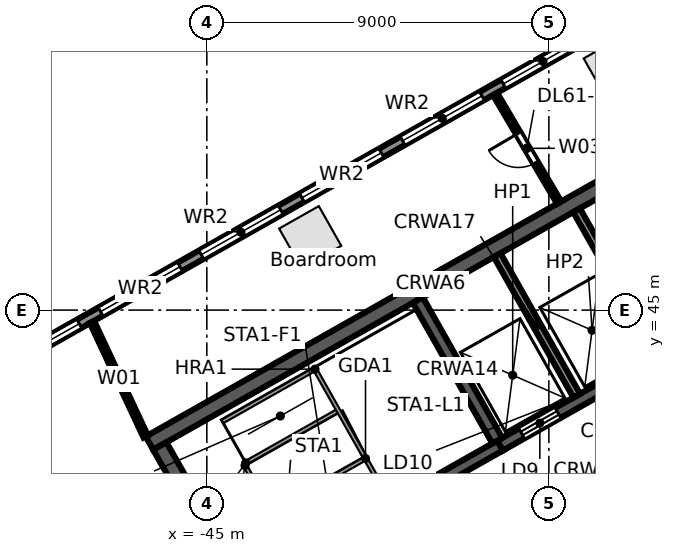
"""IFC4 building model, lengths in metres.
Left out: names, types, materials, properties, quantities, classifications, styles, units other than length and angle.
Written with IfcOpenShell. Run it as: python <this file> out.ifc"""

import sys

from ifc_helpers import new_model, si_unit, direction, frame, frame_2d, origin, origin_2d, place, context, subcontext, project, spatial, rectangle, extrude, element, fill, save


model = new_model("IFC4")
c1 = context("Model", 3, precision=1e-05, world=origin(), true_north=direction((0.0, 1.0)))
c2 = subcontext(c1, "Body", "Model", "MODEL_VIEW")
j1 = project(units=[si_unit("LENGTHUNIT", "METRE"), si_unit("PLANEANGLEUNIT", "RADIAN")], contexts=[c1])
p1 = place(None, origin())
s1 = spatial("IfcSite", under=j1, at=p1, CompositionType="ELEMENT")
p2 = place(p1, origin())
s2 = spatial("IfcBuilding", under=s1, at=p2, CompositionType="ELEMENT")
p3 = place(p2, frame((0.0, 0.0, 274.1)))
s3 = spatial("IfcBuildingStorey", under=s2, at=p3, CompositionType="ELEMENT", Elevation=274.1)
p4 = place(p3, frame((-34.334, 51.414, 0.0), z_axis=(0.0, 0.0, 1.0), x_axis=(-0.87035569594, -0.492423560103, 0.0)))
e1 = element("IfcColumn", 1, at=p4, inside=s3, PredefinedType="COLUMN", context=c2, shape_type="SweptSolid", body=[
    extrude(rectangle(XDim=1.1, YDim=1.1, at=origin_2d()), origin(), (0.0, 0.0, 1.0), 3.8),
])
p5 = place(p3, frame((-42.28, 46.919, 0.0), z_axis=(0.0, 0.0, 1.0), x_axis=(-0.87035569594, -0.492423560103, 0.0)))
e2 = element("IfcColumn", 2, at=p5, inside=s3, PredefinedType="COLUMN", context=c2, shape_type="SweptSolid", body=[
    extrude(rectangle(XDim=1.2, YDim=1.2, at=origin_2d()), origin(), (0.0, 0.0, 1.0), 3.8),
])
p6 = place(p3, frame((-58.732, 38.771, 0.0), z_axis=(0.0, 0.0, 1.0), x_axis=(0.870355615581, 0.492423702137, 0.0)))
e3 = element("IfcWall", 3, at=p6, inside=s3, PredefinedType="STANDARD", context=c2, shape_type="SweptSolid", body=[
    extrude(rectangle(XDim=64.052, YDim=0.25, at=frame_2d((32.026, 0.0))), origin(), (0.0, 0.0, 1.0), 3.52),
])
p7 = place(p6, frame((61.259, 0.0, 0.8)))
e4 = element("IfcOpeningElement", 4, at=p7, cuts=e3, PredefinedType="OPENING", context=c2, shape_type="SweptSolid", body=[
    extrude(rectangle(XDim=2.4, YDim=2.2, at=frame_2d((1.2, 1.1))), frame((0.0, 0.135, 0.0), z_axis=(0.0, -1.0, 0.0), x_axis=(1.0, 0.0, 0.0)), (0.0, 0.0, 1.0), 0.27),
])
p8 = place(p6, frame((58.216, 0.0, 0.8)))
e5 = element("IfcOpeningElement", 5, at=p8, cuts=e3, PredefinedType="OPENING", context=c2, shape_type="SweptSolid", body=[
    extrude(rectangle(XDim=2.4, YDim=2.2, at=frame_2d((1.2, 1.1))), frame((0.0, 0.135, 0.0), z_axis=(0.0, -1.0, 0.0), x_axis=(1.0, 0.0, 0.0)), (0.0, 0.0, 1.0), 0.27),
])
p9 = place(p6, frame((55.173, 0.0, 0.8)))
e6 = element("IfcOpeningElement", 6, at=p9, cuts=e3, PredefinedType="OPENING", context=c2, shape_type="SweptSolid", body=[
    extrude(rectangle(XDim=2.4, YDim=2.2, at=frame_2d((1.2, 1.1))), frame((0.0, 0.135, 0.0), z_axis=(0.0, -1.0, 0.0), x_axis=(1.0, 0.0, 0.0)), (0.0, 0.0, 1.0), 0.27),
])
p10 = place(p6, frame((52.129, 0.0, 0.8)))
e7 = element("IfcOpeningElement", 7, at=p10, cuts=e3, PredefinedType="OPENING", context=c2, shape_type="SweptSolid", body=[
    extrude(rectangle(XDim=2.4, YDim=2.2, at=frame_2d((1.2, 1.1))), frame((0.0, 0.135, 0.0), z_axis=(0.0, -1.0, 0.0), x_axis=(1.0, 0.0, 0.0)), (0.0, 0.0, 1.0), 0.27),
])
p11 = place(p6, frame((49.086, 0.0, 0.8)))
e8 = element("IfcOpeningElement", 8, at=p11, cuts=e3, PredefinedType="OPENING", context=c2, shape_type="SweptSolid", body=[
    extrude(rectangle(XDim=2.4, YDim=2.2, at=frame_2d((1.2, 1.1))), frame((0.0, 0.135, 0.0), z_axis=(0.0, -1.0, 0.0), x_axis=(1.0, 0.0, 0.0)), (0.0, 0.0, 1.0), 0.27),
])
p12 = place(p6, frame((46.043, 0.0, 0.8)))
e9 = element("IfcOpeningElement", 9, at=p12, cuts=e3, PredefinedType="OPENING", context=c2, shape_type="SweptSolid", body=[
    extrude(rectangle(XDim=2.4, YDim=2.2, at=frame_2d((1.2, 1.1))), frame((0.0, 0.135, 0.0), z_axis=(0.0, -1.0, 0.0), x_axis=(1.0, 0.0, 0.0)), (0.0, 0.0, 1.0), 0.27),
])
p13 = place(p6, frame((43.0, 0.0, 0.8)))
e10 = element("IfcOpeningElement", 10, at=p13, cuts=e3, PredefinedType="OPENING", context=c2, shape_type="SweptSolid", body=[
    extrude(rectangle(XDim=2.4, YDim=2.2, at=frame_2d((1.2, 1.1))), frame((0.0, 0.135, 0.0), z_axis=(0.0, -1.0, 0.0), x_axis=(1.0, 0.0, 0.0)), (0.0, 0.0, 1.0), 0.27),
])
p14 = place(p6, frame((39.956, 0.0, 0.8)))
e11 = element("IfcOpeningElement", 11, at=p14, cuts=e3, PredefinedType="OPENING", context=c2, shape_type="SweptSolid", body=[
    extrude(rectangle(XDim=2.4, YDim=2.2, at=frame_2d((1.2, 1.1))), frame((0.0, 0.135, 0.0), z_axis=(0.0, -1.0, 0.0), x_axis=(1.0, 0.0, 0.0)), (0.0, 0.0, 1.0), 0.27),
])
p15 = place(p6, frame((36.913, 0.0, 0.8)))
e12 = element("IfcOpeningElement", 12, at=p15, cuts=e3, PredefinedType="OPENING", context=c2, shape_type="SweptSolid", body=[
    extrude(rectangle(XDim=2.4, YDim=2.2, at=frame_2d((1.2, 1.1))), frame((0.0, 0.135, 0.0), z_axis=(0.0, -1.0, 0.0), x_axis=(1.0, 0.0, 0.0)), (0.0, 0.0, 1.0), 0.27),
])
p16 = place(p6, frame((33.87, 0.0, 0.8)))
e13 = element("IfcOpeningElement", 13, at=p16, cuts=e3, PredefinedType="OPENING", context=c2, shape_type="SweptSolid", body=[
    extrude(rectangle(XDim=2.4, YDim=2.2, at=frame_2d((1.2, 1.1))), frame((0.0, 0.135, 0.0), z_axis=(0.0, -1.0, 0.0), x_axis=(1.0, 0.0, 0.0)), (0.0, 0.0, 1.0), 0.27),
])
p17 = place(p6, frame((30.826, 0.0, 0.8)))
e14 = element("IfcOpeningElement", 14, at=p17, cuts=e3, PredefinedType="OPENING", context=c2, shape_type="SweptSolid", body=[
    extrude(rectangle(XDim=2.4, YDim=2.2, at=frame_2d((1.2, 1.1))), frame((0.0, 0.135, 0.0), z_axis=(0.0, -1.0, 0.0), x_axis=(1.0, 0.0, 0.0)), (0.0, 0.0, 1.0), 0.27),
])
p18 = place(p6, frame((27.783, 0.0, 0.8)))
e15 = element("IfcOpeningElement", 15, at=p18, cuts=e3, PredefinedType="OPENING", context=c2, shape_type="SweptSolid", body=[
    extrude(rectangle(XDim=2.4, YDim=2.2, at=frame_2d((1.2, 1.1))), frame((0.0, 0.135, 0.0), z_axis=(0.0, -1.0, 0.0), x_axis=(1.0, 0.0, 0.0)), (0.0, 0.0, 1.0), 0.27),
])
p19 = place(p6, frame((24.74, 0.0, 0.8)))
e16 = element("IfcOpeningElement", 16, at=p19, cuts=e3, PredefinedType="OPENING", context=c2, shape_type="SweptSolid", body=[
    extrude(rectangle(XDim=2.4, YDim=2.2, at=frame_2d((1.2, 1.1))), frame((0.0, 0.135, 0.0), z_axis=(0.0, -1.0, 0.0), x_axis=(1.0, 0.0, 0.0)), (0.0, 0.0, 1.0), 0.27),
])
p20 = place(p6, frame((21.696, 0.0, 0.8)))
e17 = element("IfcOpeningElement", 17, at=p20, cuts=e3, PredefinedType="OPENING", context=c2, shape_type="SweptSolid", body=[
    extrude(rectangle(XDim=2.4, YDim=2.2, at=frame_2d((1.2, 1.1))), frame((0.0, 0.135, 0.0), z_axis=(0.0, -1.0, 0.0), x_axis=(1.0, 0.0, 0.0)), (0.0, 0.0, 1.0), 0.27),
])
p21 = place(p6, frame((18.653, 0.0, 0.8)))
e18 = element("IfcOpeningElement", 18, at=p21, cuts=e3, PredefinedType="OPENING", context=c2, shape_type="SweptSolid", body=[
    extrude(rectangle(XDim=2.4, YDim=2.2, at=frame_2d((1.2, 1.1))), frame((0.0, 0.135, 0.0), z_axis=(0.0, -1.0, 0.0), x_axis=(1.0, 0.0, 0.0)), (0.0, 0.0, 1.0), 0.27),
])
p22 = place(p6, frame((15.61, 0.0, 0.8)))
e19 = element("IfcOpeningElement", 19, at=p22, cuts=e3, PredefinedType="OPENING", context=c2, shape_type="SweptSolid", body=[
    extrude(rectangle(XDim=2.4, YDim=2.2, at=frame_2d((1.2, 1.1))), frame((0.0, 0.135, 0.0), z_axis=(0.0, -1.0, 0.0), x_axis=(1.0, 0.0, 0.0)), (0.0, 0.0, 1.0), 0.27),
])
p23 = place(p6, frame((12.567, 0.0, 0.8)))
e20 = element("IfcOpeningElement", 20, at=p23, cuts=e3, PredefinedType="OPENING", context=c2, shape_type="SweptSolid", body=[
    extrude(rectangle(XDim=2.4, YDim=2.2, at=frame_2d((1.2, 1.1))), frame((0.0, 0.135, 0.0), z_axis=(0.0, -1.0, 0.0), x_axis=(1.0, 0.0, 0.0)), (0.0, 0.0, 1.0), 0.27),
])
p24 = place(p6, frame((9.523, 0.0, 0.8)))
e21 = element("IfcOpeningElement", 21, at=p24, cuts=e3, PredefinedType="OPENING", context=c2, shape_type="SweptSolid", body=[
    extrude(rectangle(XDim=2.4, YDim=2.2, at=frame_2d((1.2, 1.1))), frame((0.0, 0.135, 0.0), z_axis=(0.0, -1.0, 0.0), x_axis=(1.0, 0.0, 0.0)), (0.0, 0.0, 1.0), 0.27),
])
p25 = place(p6, frame((6.48, 0.0, 0.8)))
e22 = element("IfcOpeningElement", 22, at=p25, cuts=e3, PredefinedType="OPENING", context=c2, shape_type="SweptSolid", body=[
    extrude(rectangle(XDim=2.4, YDim=2.2, at=frame_2d((1.2, 1.1))), frame((0.0, 0.135, 0.0), z_axis=(0.0, -1.0, 0.0), x_axis=(1.0, 0.0, 0.0)), (0.0, 0.0, 1.0), 0.27),
])
p26 = place(p6, frame((3.437, 0.0, 0.8)))
e23 = element("IfcOpeningElement", 23, at=p26, cuts=e3, PredefinedType="OPENING", context=c2, shape_type="SweptSolid", body=[
    extrude(rectangle(XDim=2.4, YDim=2.2, at=frame_2d((1.2, 1.1))), frame((0.0, 0.135, 0.0), z_axis=(0.0, -1.0, 0.0), x_axis=(1.0, 0.0, 0.0)), (0.0, 0.0, 1.0), 0.27),
])
p27 = place(p6, frame((0.393, 0.0, 0.8)))
e24 = element("IfcOpeningElement", 24, at=p27, cuts=e3, PredefinedType="OPENING", context=c2, shape_type="SweptSolid", body=[
    extrude(rectangle(XDim=2.4, YDim=2.2, at=frame_2d((1.2, 1.1))), frame((0.0, 0.135, 0.0), z_axis=(0.0, -1.0, 0.0), x_axis=(1.0, 0.0, 0.0)), (0.0, 0.0, 1.0), 0.27),
])
p28 = place(p3, frame((-3.017, 46.293, 0.0), z_axis=(0.0, 0.0, 1.0), x_axis=(-0.870355474887, -0.492423950812, 0.0)))
e25 = element("IfcWall", 25, at=p28, inside=s3, PredefinedType="STANDARD", context=c2, shape_type="SweptSolid", body=[
    extrude(rectangle(XDim=40.34, YDim=0.25, at=frame_2d((20.17, 0.0))), origin(), (0.0, 0.0, 1.0), 3.52),
])
p29 = place(p28, frame((37.428, 0.0, 0.8)))
e26 = element("IfcOpeningElement", 26, at=p29, cuts=e25, PredefinedType="OPENING", context=c2, shape_type="SweptSolid", body=[
    extrude(rectangle(XDim=2.4, YDim=2.2, at=frame_2d((1.2, 1.1))), frame((0.0, 0.135, 0.0), z_axis=(0.0, -1.0, 0.0), x_axis=(1.0, 0.0, 0.0)), (0.0, 0.0, 1.0), 0.27),
])
p30 = place(p28, frame((34.372, 0.0, 0.0)))
e27 = element("IfcOpeningElement", 27, at=p30, cuts=e25, PredefinedType="OPENING", context=c2, shape_type="SweptSolid", body=[
    extrude(rectangle(XDim=1.8, YDim=2.4, at=frame_2d((0.9, 1.2))), frame((0.0, 0.135, 0.0), z_axis=(0.0, -1.0, 0.0), x_axis=(1.0, 0.0, 0.0)), (0.0, 0.0, 1.0), 0.27),
])
p31 = place(p28, frame((30.716, 0.0, 0.8)))
e28 = element("IfcOpeningElement", 28, at=p31, cuts=e25, PredefinedType="OPENING", context=c2, shape_type="SweptSolid", body=[
    extrude(rectangle(XDim=2.4, YDim=2.2, at=frame_2d((1.2, 1.1))), frame((0.0, 0.135, 0.0), z_axis=(0.0, -1.0, 0.0), x_axis=(1.0, 0.0, 0.0)), (0.0, 0.0, 1.0), 0.27),
])
p32 = place(p28, frame((27.36, 0.0, 0.8)))
e29 = element("IfcOpeningElement", 29, at=p32, cuts=e25, PredefinedType="OPENING", context=c2, shape_type="SweptSolid", body=[
    extrude(rectangle(XDim=2.4, YDim=2.2, at=frame_2d((1.2, 1.1))), frame((0.0, 0.135, 0.0), z_axis=(0.0, -1.0, 0.0), x_axis=(1.0, 0.0, 0.0)), (0.0, 0.0, 1.0), 0.27),
])
p33 = place(p28, frame((24.304, 0.0, 0.0)))
e30 = element("IfcOpeningElement", 30, at=p33, cuts=e25, PredefinedType="OPENING", context=c2, shape_type="SweptSolid", body=[
    extrude(rectangle(XDim=1.8, YDim=2.4, at=frame_2d((0.9, 1.2))), frame((0.0, 0.135, 0.0), z_axis=(0.0, -1.0, 0.0), x_axis=(1.0, 0.0, 0.0)), (0.0, 0.0, 1.0), 0.27),
])
p34 = place(p28, frame((20.648, 0.0, 0.8)))
e31 = element("IfcOpeningElement", 31, at=p34, cuts=e25, PredefinedType="OPENING", context=c2, shape_type="SweptSolid", body=[
    extrude(rectangle(XDim=2.4, YDim=2.2, at=frame_2d((1.2, 1.1))), frame((0.0, 0.135, 0.0), z_axis=(0.0, -1.0, 0.0), x_axis=(1.0, 0.0, 0.0)), (0.0, 0.0, 1.0), 0.27),
])
p35 = place(p28, frame((17.292, 0.0, 0.8)))
e32 = element("IfcOpeningElement", 32, at=p35, cuts=e25, PredefinedType="OPENING", context=c2, shape_type="SweptSolid", body=[
    extrude(rectangle(XDim=2.4, YDim=2.2, at=frame_2d((1.2, 1.1))), frame((0.0, 0.135, 0.0), z_axis=(0.0, -1.0, 0.0), x_axis=(1.0, 0.0, 0.0)), (0.0, 0.0, 1.0), 0.27),
])
p36 = place(p28, frame((14.236, 0.0, 0.0)))
e33 = element("IfcOpeningElement", 33, at=p36, cuts=e25, PredefinedType="OPENING", context=c2, shape_type="SweptSolid", body=[
    extrude(rectangle(XDim=1.8, YDim=2.4, at=frame_2d((0.9, 1.2))), frame((0.0, 0.135, 0.0), z_axis=(0.0, -1.0, 0.0), x_axis=(1.0, 0.0, 0.0)), (0.0, 0.0, 1.0), 0.27),
])
p37 = place(p28, frame((10.58, 0.0, 0.8)))
e34 = element("IfcOpeningElement", 34, at=p37, cuts=e25, PredefinedType="OPENING", context=c2, shape_type="SweptSolid", body=[
    extrude(rectangle(XDim=2.4, YDim=2.2, at=frame_2d((1.2, 1.1))), frame((0.0, 0.135, 0.0), z_axis=(0.0, -1.0, 0.0), x_axis=(1.0, 0.0, 0.0)), (0.0, 0.0, 1.0), 0.27),
])
p38 = place(p28, frame((7.224, 0.0, 0.8)))
e35 = element("IfcOpeningElement", 35, at=p38, cuts=e25, PredefinedType="OPENING", context=c2, shape_type="SweptSolid", body=[
    extrude(rectangle(XDim=2.4, YDim=2.2, at=frame_2d((1.2, 1.1))), frame((0.0, 0.135, 0.0), z_axis=(0.0, -1.0, 0.0), x_axis=(1.0, 0.0, 0.0)), (0.0, 0.0, 1.0), 0.27),
])
p39 = place(p28, frame((4.168, 0.0, 0.0)))
e36 = element("IfcOpeningElement", 36, at=p39, cuts=e25, PredefinedType="OPENING", context=c2, shape_type="SweptSolid", body=[
    extrude(rectangle(XDim=1.8, YDim=2.4, at=frame_2d((0.9, 1.2))), frame((0.0, 0.135, 0.0), z_axis=(0.0, -1.0, 0.0), x_axis=(1.0, 0.0, 0.0)), (0.0, 0.0, 1.0), 0.27),
])
p40 = place(p28, frame((0.512, 0.0, 0.8)))
e37 = element("IfcOpeningElement", 37, at=p40, cuts=e25, PredefinedType="OPENING", context=c2, shape_type="SweptSolid", body=[
    extrude(rectangle(XDim=2.4, YDim=2.2, at=frame_2d((1.2, 1.1))), frame((0.0, 0.135, 0.0), z_axis=(0.0, -1.0, 0.0), x_axis=(1.0, 0.0, 0.0)), (0.0, 0.0, 1.0), 0.27),
])
p41 = place(p3, frame((-43.897, 37.692, 0.0), z_axis=(0.0, 0.0, 1.0), x_axis=(0.870356351998, 0.492422400523, 0.0)))
e38 = element("IfcWall", 38, at=p41, inside=s3, PredefinedType="SOLIDWALL", context=c2, shape_type="SweptSolid", body=[
    extrude(rectangle(XDim=7.6, YDim=0.3, at=frame_2d((3.8, 0.0))), origin(), (0.0, 0.0, 1.0), 3.52),
])
p42 = place(p41, frame((0.4, 0.0, 0.0)))
e39 = element("IfcOpeningElement", 39, at=p42, cuts=e38, PredefinedType="OPENING", context=c2, shape_type="SweptSolid", body=[
    extrude(rectangle(XDim=1.0, YDim=2.1, at=frame_2d((0.5, 1.05))), frame((0.0, 0.16, 0.0), z_axis=(0.0, -1.0, 0.0), x_axis=(1.0, 0.0, 0.0)), (0.0, 0.0, 1.0), 0.32),
])
p43 = place(p3, frame((-37.282, 41.435, 0.0), z_axis=(0.0, 0.0, 1.0), x_axis=(0.870361315115, 0.492413628113, 0.0)))
e40 = element("IfcWall", 40, at=p43, inside=s3, PredefinedType="SOLIDWALL", context=c2, shape_type="SweptSolid", body=[
    extrude(rectangle(XDim=8.6, YDim=0.3, at=frame_2d((4.3, 0.0))), origin(), (0.0, 0.0, 1.0), 3.52),
])
p44 = place(p43, frame((0.65, 0.0, 0.0)))
e41 = element("IfcOpeningElement", 41, at=p44, cuts=e40, PredefinedType="OPENING", context=c2, shape_type="SweptSolid", body=[
    extrude(rectangle(XDim=1.1, YDim=2.1, at=frame_2d((0.55, 1.05))), frame((0.0, 0.16, 0.0), z_axis=(0.0, -1.0, 0.0), x_axis=(1.0, 0.0, 0.0)), (0.0, 0.0, 1.0), 0.32),
])
p45 = place(p43, frame((3.05, 0.0, 0.0)))
e42 = element("IfcOpeningElement", 42, at=p45, cuts=e40, PredefinedType="OPENING", context=c2, shape_type="SweptSolid", body=[
    extrude(rectangle(XDim=1.1, YDim=2.1, at=frame_2d((0.55, 1.05))), frame((0.0, 0.16, 0.0), z_axis=(0.0, -1.0, 0.0), x_axis=(1.0, 0.0, 0.0)), (0.0, 0.0, 1.0), 0.32),
])
p46 = place(p43, frame((6.2, 0.0, 0.0)))
e43 = element("IfcOpeningElement", 43, at=p46, cuts=e40, PredefinedType="OPENING", context=c2, shape_type="SweptSolid", body=[
    extrude(rectangle(XDim=1.1, YDim=2.1, at=frame_2d((0.55, 1.05))), frame((0.0, 0.16, 0.0), z_axis=(0.0, -1.0, 0.0), x_axis=(1.0, 0.0, 0.0)), (0.0, 0.0, 1.0), 0.32),
])
p47 = place(p3, frame((-46.51, 41.499, 0.0), z_axis=(0.0, 0.0, 1.0), x_axis=(0.870356271124, 0.492422543467, 0.0)))
e44 = element("IfcWall", 44, at=p47, inside=s3, PredefinedType="SOLIDWALL", context=c2, shape_type="SweptSolid", body=[
    extrude(rectangle(XDim=17.0, YDim=0.4, at=frame_2d((8.5, 0.0))), origin(), (0.0, 0.0, 1.0), 3.52),
])
p48 = place(p3, frame((-46.238, 41.423, 0.0), z_axis=(0.0, 0.0, 1.0), x_axis=(0.492421663121, -0.870356769198, 0.0)))
e45 = element("IfcWall", 45, at=p48, inside=s3, PredefinedType="SOLIDWALL", context=c2, shape_type="SweptSolid", body=[
    extrude(rectangle(XDim=13.2, YDim=0.4, at=frame_2d((6.6, 0.0))), origin(), (0.0, 0.0, 1.0), 3.52),
])
p49 = place(p3, frame((-39.449, 45.264, 0.0), z_axis=(0.0, 0.0, 1.0), x_axis=(0.492422543467, -0.870356271124, 0.0)))
e46 = element("IfcWall", 46, at=p49, inside=s3, PredefinedType="SOLIDWALL", context=c2, shape_type="SweptSolid", body=[
    extrude(rectangle(XDim=4.25, YDim=0.3, at=frame_2d((2.125, 0.0))), origin(), (0.0, 0.0, 1.0), 3.52),
])
for number, where, z_axis, x_axis in (
    (47, (-37.36, 46.446, 0.0), (0.0, 0.0, 1.0), (0.492, -0.87, 0.0)),
    (48, (-35.271, 47.628, 0.0), (0.0, 0.0, 1.0), (0.492, -0.87, 0.0)),
):
    element("IfcWall", number, at=place(p3, frame(where, z_axis=z_axis, x_axis=x_axis)), inside=s3, PredefinedType="SOLIDWALL", context=c2, shape_type="SweptSolid", body=[
        extrude(rectangle(XDim=4.25, YDim=0.2, at=frame_2d((2.125, 0.0))), origin(), (0.0, 0.0, 1.0), 3.52),
    ])
p50 = place(p3, frame((-48.022, 44.687, 0.0), z_axis=(0.0, 0.0, 1.0), x_axis=(0.424510917438, -0.905422818895, 0.0)))
e49 = element("IfcWall", 49, at=p50, inside=s3, PredefinedType="PARTITIONING", context=c2, shape_type="SweptSolid", body=[
    extrude(rectangle(XDim=3.329, YDim=0.125, at=frame_2d((1.665, 0.0))), origin(), (0.0, 0.0, 1.0), 2.888),
])
p51 = place(p3, frame((-37.416, 50.687, 0.0), z_axis=(0.0, 0.0, 1.0), x_axis=(0.508176683483, -0.861252842297, 0.0)))
e50 = element("IfcWall", 50, at=p51, inside=s3, PredefinedType="PARTITIONING", context=c2, shape_type="SweptSolid", body=[
    extrude(rectangle(XDim=3.32, YDim=0.125, at=frame_2d((1.66, 0.0))), origin(), (0.0, 0.0, 1.0), 2.888),
])
p52 = place(p51, frame((1.2, 0.0, 0.0)))
e51 = element("IfcOpeningElement", 51, at=p52, cuts=e50, PredefinedType="OPENING", context=c2, shape_type="SweptSolid", body=[
    extrude(rectangle(XDim=0.9, YDim=2.1, at=frame_2d((0.45, 1.05))), frame((0.0, 0.073, 0.0), z_axis=(0.0, -1.0, 0.0), x_axis=(1.0, 0.0, 0.0)), (0.0, 0.0, 1.0), 0.145),
])
p53 = place(p19, origin())
e52 = element("IfcWindow", 52, at=p53, inside=s3, PartitioningType="SINGLE_PANEL", PredefinedType="WINDOW", context=c2, shape_type="SweptSolid", body=[
    extrude(rectangle(XDim=2.4, YDim=2.2, at=frame_2d((1.2, 1.1))), frame((0.0, 0.03, 0.0), z_axis=(0.0, -1.0, 0.0), x_axis=(1.0, 0.0, 0.0)), (0.0, 0.0, 1.0), 0.06),
])
fill(e16, e52)
p54 = place(p20, origin())
e53 = element("IfcWindow", 53, at=p54, inside=s3, PartitioningType="SINGLE_PANEL", PredefinedType="WINDOW", context=c2, shape_type="SweptSolid", body=[
    extrude(rectangle(XDim=2.4, YDim=2.2, at=frame_2d((1.2, 1.1))), frame((0.0, 0.03, 0.0), z_axis=(0.0, -1.0, 0.0), x_axis=(1.0, 0.0, 0.0)), (0.0, 0.0, 1.0), 0.06),
])
fill(e17, e53)
p55 = place(p21, origin())
e54 = element("IfcWindow", 54, at=p55, inside=s3, PartitioningType="SINGLE_PANEL", PredefinedType="WINDOW", context=c2, shape_type="SweptSolid", body=[
    extrude(rectangle(XDim=2.4, YDim=2.2, at=frame_2d((1.2, 1.1))), frame((0.0, 0.03, 0.0), z_axis=(0.0, -1.0, 0.0), x_axis=(1.0, 0.0, 0.0)), (0.0, 0.0, 1.0), 0.06),
])
fill(e18, e54)
p56 = place(p22, origin())
e55 = element("IfcWindow", 55, at=p56, inside=s3, PartitioningType="SINGLE_PANEL", PredefinedType="WINDOW", context=c2, shape_type="SweptSolid", body=[
    extrude(rectangle(XDim=2.4, YDim=2.2, at=frame_2d((1.2, 1.1))), frame((0.0, 0.03, 0.0), z_axis=(0.0, -1.0, 0.0), x_axis=(1.0, 0.0, 0.0)), (0.0, 0.0, 1.0), 0.06),
])
fill(e19, e55)
p57 = place(p23, origin())
e56 = element("IfcWindow", 56, at=p57, inside=s3, PartitioningType="SINGLE_PANEL", PredefinedType="WINDOW", context=c2, shape_type="SweptSolid", body=[
    extrude(rectangle(XDim=2.4, YDim=2.2, at=frame_2d((1.2, 1.1))), frame((0.0, 0.03, 0.0), z_axis=(0.0, -1.0, 0.0), x_axis=(1.0, 0.0, 0.0)), (0.0, 0.0, 1.0), 0.06),
])
fill(e20, e56)
p58 = place(p24, origin())
e57 = element("IfcWindow", 57, at=p58, inside=s3, PartitioningType="SINGLE_PANEL", PredefinedType="WINDOW", context=c2, shape_type="SweptSolid", body=[
    extrude(rectangle(XDim=2.4, YDim=2.2, at=frame_2d((1.2, 1.1))), frame((0.0, 0.03, 0.0), z_axis=(0.0, -1.0, 0.0), x_axis=(1.0, 0.0, 0.0)), (0.0, 0.0, 1.0), 0.06),
])
fill(e21, e57)
p59 = place(p44, origin())
e58 = element("IfcDoor", 58, at=p59, inside=s3, OperationType="DOUBLE_DOOR_SLIDING", PredefinedType="DOOR", context=c2, shape_type="SweptSolid", body=[
    extrude(rectangle(XDim=1.1, YDim=2.1, at=frame_2d((0.55, 1.05))), frame((0.0, 0.025, 0.0), z_axis=(0.0, -1.0, 0.0), x_axis=(1.0, 0.0, 0.0)), (0.0, 0.0, 1.0), 0.05),
])
fill(e41, e58)
p60 = place(p52, frame((0.9, 0.0, 0.0), z_axis=(0.0, 0.0, 1.0), x_axis=(-1.0, 0.0, 0.0)))
e59 = element("IfcDoor", 59, at=p60, inside=s3, OperationType="SINGLE_SWING_RIGHT", PredefinedType="DOOR", context=c2, shape_type="SweptSolid", body=[
    extrude(rectangle(XDim=0.9, YDim=2.1, at=frame_2d((0.45, 1.05))), frame((0.0, 0.025, 0.0), z_axis=(0.0, -1.0, 0.0), x_axis=(1.0, 0.0, 0.0)), (0.0, 0.0, 1.0), 0.05),
])
fill(e51, e59)
save(model, sys.argv[1])
